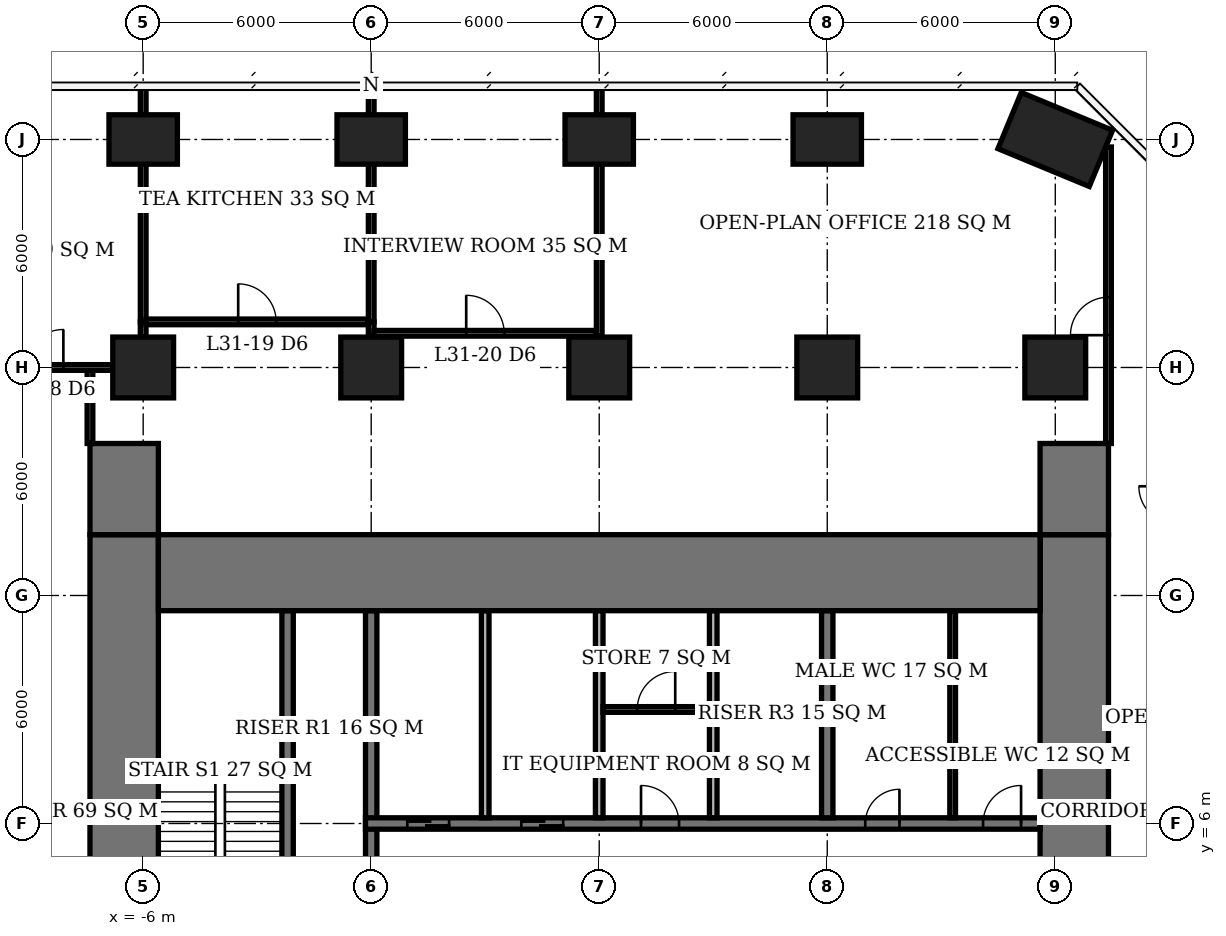
"""IFC4 building model, lengths in metres.
Left out: names, types, materials, properties, quantities, classifications, styles, units other than length and angle.
Written with IfcOpenShell. Run it as: python <this file> out.ifc"""

import sys

from ifc_helpers import new_model, si_unit, direction, frame, frame_2d, origin, origin_2d, place, context, subcontext, project, spatial, rectangle, extrude, element, fill, save


model = new_model("IFC4")
c1 = context("Model", 3, precision=1e-05, world=origin(), true_north=direction((0.0, 1.0)))
c2 = subcontext(c1, "Body", "Model", "MODEL_VIEW")
j1 = project(units=[si_unit("LENGTHUNIT", "METRE"), si_unit("PLANEANGLEUNIT", "RADIAN")], contexts=[c1])
p1 = place(None, origin())
s1 = spatial("IfcSite", under=j1, at=p1, CompositionType="ELEMENT")
p2 = place(p1, origin())
s2 = spatial("IfcBuilding", under=s1, at=p2, CompositionType="ELEMENT")
p3 = place(p2, frame((0.0, 0.0, 128.9)))
s3 = spatial("IfcBuildingStorey", under=s2, at=p3, CompositionType="ELEMENT", Elevation=128.9)
p4 = place(p3, frame((-6.0, 18.0, 0.0), z_axis=(0.0, 0.0, 1.0), x_axis=(1.0, 0.0, 0.0)))
e1 = element("IfcColumn", 1, at=p4, inside=s3, PredefinedType="COLUMN", context=c2, shape_type="SweptSolid", body=[
    extrude(rectangle(XDim=1.6, YDim=1.6, at=origin_2d()), origin(), (0.0, 0.0, 1.0), 3.9),
])
p5 = place(p3, frame((-6.0, 24.0, 0.0), z_axis=(0.0, 0.0, 1.0), x_axis=(1.0, 0.0, 0.0)))
e2 = element("IfcColumn", 2, at=p5, inside=s3, PredefinedType="COLUMN", context=c2, shape_type="SweptSolid", body=[
    extrude(rectangle(XDim=1.8, YDim=1.3, at=origin_2d()), origin(), (0.0, 0.0, 1.0), 3.9),
])
p6 = place(p3, frame((0.0, 18.0, 0.0), z_axis=(0.0, 0.0, 1.0), x_axis=(1.0, 0.0, 0.0)))
e3 = element("IfcColumn", 3, at=p6, inside=s3, PredefinedType="COLUMN", context=c2, shape_type="SweptSolid", body=[
    extrude(rectangle(XDim=1.6, YDim=1.6, at=origin_2d()), origin(), (0.0, 0.0, 1.0), 3.9),
])
p7 = place(p3, frame((0.0, 24.0, 0.0), z_axis=(0.0, 0.0, 1.0), x_axis=(1.0, 0.0, 0.0)))
e4 = element("IfcColumn", 4, at=p7, inside=s3, PredefinedType="COLUMN", context=c2, shape_type="SweptSolid", body=[
    extrude(rectangle(XDim=1.8, YDim=1.3, at=origin_2d()), origin(), (0.0, 0.0, 1.0), 3.9),
])
p8 = place(p3, frame((6.0, 18.0, 0.0), z_axis=(0.0, 0.0, 1.0), x_axis=(1.0, 0.0, 0.0)))
e5 = element("IfcColumn", 5, at=p8, inside=s3, PredefinedType="COLUMN", context=c2, shape_type="SweptSolid", body=[
    extrude(rectangle(XDim=1.6, YDim=1.6, at=origin_2d()), origin(), (0.0, 0.0, 1.0), 3.9),
])
p9 = place(p3, frame((6.0, 24.0, 0.0), z_axis=(0.0, 0.0, 1.0), x_axis=(1.0, 0.0, 0.0)))
e6 = element("IfcColumn", 6, at=p9, inside=s3, PredefinedType="COLUMN", context=c2, shape_type="SweptSolid", body=[
    extrude(rectangle(XDim=1.8, YDim=1.3, at=origin_2d()), origin(), (0.0, 0.0, 1.0), 3.9),
])
p10 = place(p3, frame((12.0, 18.0, 0.0), z_axis=(0.0, 0.0, 1.0), x_axis=(1.0, 0.0, 0.0)))
e7 = element("IfcColumn", 7, at=p10, inside=s3, PredefinedType="COLUMN", context=c2, shape_type="SweptSolid", body=[
    extrude(rectangle(XDim=1.6, YDim=1.6, at=origin_2d()), origin(), (0.0, 0.0, 1.0), 3.9),
])
p11 = place(p3, frame((12.0, 24.0, 0.0), z_axis=(0.0, 0.0, 1.0), x_axis=(1.0, 0.0, 0.0)))
e8 = element("IfcColumn", 8, at=p11, inside=s3, PredefinedType="COLUMN", context=c2, shape_type="SweptSolid", body=[
    extrude(rectangle(XDim=1.8, YDim=1.3, at=origin_2d()), origin(), (0.0, 0.0, 1.0), 3.9),
])
p12 = place(p3, frame((18.0, 18.0, 0.0), z_axis=(0.0, 0.0, 1.0), x_axis=(1.0, 0.0, 0.0)))
e9 = element("IfcColumn", 9, at=p12, inside=s3, PredefinedType="COLUMN", context=c2, shape_type="SweptSolid", body=[
    extrude(rectangle(XDim=1.6, YDim=1.6, at=origin_2d()), origin(), (0.0, 0.0, 1.0), 3.9),
])
p13 = place(p3, frame((18.0, 24.0, 0.0), z_axis=(0.0, 0.0, 1.0), x_axis=(0.923879532511, -0.382683432365, 0.0)))
e10 = element("IfcColumn", 10, at=p13, inside=s3, PredefinedType="COLUMN", context=c2, shape_type="SweptSolid", body=[
    extrude(rectangle(XDim=2.6, YDim=1.6, at=origin_2d()), origin(), (0.0, 0.0, 1.0), 3.9),
])
p14 = place(p3, frame((-5.6, 12.6, 0.0), z_axis=(0.0, 0.0, 1.0), x_axis=(1.0, 0.0, 0.0)))
e11 = element("IfcWall", 11, at=p14, inside=s3, PredefinedType="SHEAR", context=c2, shape_type="SweptSolid", body=[
    extrude(rectangle(XDim=23.2, YDim=2.0, at=frame_2d((11.6, 0.0))), origin(), (0.0, 0.0, 1.0), 3.9),
])
p15 = place(p3, frame((-6.5, -7.6, 0.0), z_axis=(0.0, 0.0, 1.0), x_axis=(0.0, 1.0, 0.0)))
e12 = element("IfcWall", 12, at=p15, inside=s3, PredefinedType="SHEAR", context=c2, shape_type="SweptSolid", body=[
    extrude(rectangle(XDim=21.2, YDim=1.8, at=frame_2d((10.6, 0.0))), origin(), (0.0, 0.0, 1.0), 3.9),
])
p16 = place(p15, frame((7.8, 0.0, 0.0)))
e13 = element("IfcOpeningElement", 13, at=p16, cuts=e12, PredefinedType="OPENING", context=c2, shape_type="SweptSolid", body=[
    extrude(rectangle(XDim=1.8, YDim=2.4, at=frame_2d((0.9, 1.2))), frame((0.0, 0.91, 0.0), z_axis=(0.0, -1.0, 0.0), x_axis=(1.0, 0.0, 0.0)), (0.0, 0.0, 1.0), 1.82),
])
p17 = place(p3, frame((18.5, -7.6, 0.0), z_axis=(0.0, 0.0, 1.0), x_axis=(0.0, 1.0, 0.0)))
e14 = element("IfcWall", 14, at=p17, inside=s3, PredefinedType="SHEAR", context=c2, shape_type="SweptSolid", body=[
    extrude(rectangle(XDim=21.2, YDim=1.8, at=frame_2d((10.6, 0.0))), origin(), (0.0, 0.0, 1.0), 3.9),
])
p18 = place(p17, frame((9.2, 0.0, 0.0)))
e15 = element("IfcOpeningElement", 15, at=p18, cuts=e14, PredefinedType="OPENING", context=c2, shape_type="SweptSolid", body=[
    extrude(rectangle(XDim=1.8, YDim=2.4, at=frame_2d((0.9, 1.2))), frame((0.0, 0.91, 0.0), z_axis=(0.0, -1.0, 0.0), x_axis=(1.0, 0.0, 0.0)), (0.0, 0.0, 1.0), 1.82),
])
for number, where, z_axis, x_axis in (
    (16, (-6.5, 13.6, 0.0), (0.0, 0.0, 1.0), (0.0, 1.0, 0.0)),
    (17, (18.5, 13.6, 0.0), (0.0, 0.0, 1.0), (0.0, 1.0, 0.0)),
):
    element("IfcWall", number, at=place(p3, frame(where, z_axis=z_axis, x_axis=x_axis)), inside=s3, PredefinedType="SHEAR", context=c2, shape_type="SweptSolid", body=[
        extrude(rectangle(XDim=2.4, YDim=1.8, at=frame_2d((1.2, 0.0))), origin(), (0.0, 0.0, 1.0), 3.9),
    ])
p19 = place(p3, frame((-0.15, 6.0, 0.0), z_axis=(0.0, 0.0, 1.0), x_axis=(1.0, 0.0, 0.0)))
e18 = element("IfcWall", 18, at=p19, inside=s3, PredefinedType="SHEAR", context=c2, shape_type="SweptSolid", body=[
    extrude(rectangle(XDim=17.75, YDim=0.3, at=frame_2d((8.875, 0.0))), origin(), (0.0, 0.0, 1.0), 3.9),
])
p20 = place(p19, frame((13.15, 0.0, 0.0)))
e19 = element("IfcOpeningElement", 19, at=p20, cuts=e18, PredefinedType="OPENING", context=c2, shape_type="SweptSolid", body=[
    extrude(rectangle(XDim=0.9, YDim=2.1, at=frame_2d((0.45, 1.05))), frame((0.0, 0.16, 0.0), z_axis=(0.0, -1.0, 0.0), x_axis=(1.0, 0.0, 0.0)), (0.0, 0.0, 1.0), 0.32),
])
p21 = place(p19, frame((16.25, 0.0, 0.0)))
e20 = element("IfcOpeningElement", 20, at=p21, cuts=e18, PredefinedType="OPENING", context=c2, shape_type="SweptSolid", body=[
    extrude(rectangle(XDim=1.0, YDim=2.1, at=frame_2d((0.5, 1.05))), frame((0.0, 0.16, 0.0), z_axis=(0.0, -1.0, 0.0), x_axis=(1.0, 0.0, 0.0)), (0.0, 0.0, 1.0), 0.32),
])
p22 = place(p19, frame((7.25, 0.0, 0.0)))
e21 = element("IfcOpeningElement", 21, at=p22, cuts=e18, PredefinedType="OPENING", context=c2, shape_type="SweptSolid", body=[
    extrude(rectangle(XDim=1.0, YDim=2.1, at=frame_2d((0.5, 1.05))), frame((0.0, 0.16, 0.0), z_axis=(0.0, -1.0, 0.0), x_axis=(1.0, 0.0, 0.0)), (0.0, 0.0, 1.0), 0.32),
])
p23 = place(p19, frame((1.1, 0.0, 0.0)))
e22 = element("IfcOpeningElement", 22, at=p23, cuts=e18, PredefinedType="OPENING", context=c2, shape_type="SweptSolid", body=[
    extrude(rectangle(XDim=1.1, YDim=2.1, at=frame_2d((0.55, 1.05))), frame((0.0, 0.16, 0.0), z_axis=(0.0, -1.0, 0.0), x_axis=(1.0, 0.0, 0.0)), (0.0, 0.0, 1.0), 0.32),
])
p24 = place(p19, frame((4.1, 0.0, 0.0)))
e23 = element("IfcOpeningElement", 23, at=p24, cuts=e18, PredefinedType="OPENING", context=c2, shape_type="SweptSolid", body=[
    extrude(rectangle(XDim=1.1, YDim=2.1, at=frame_2d((0.55, 1.05))), frame((0.0, 0.16, 0.0), z_axis=(0.0, -1.0, 0.0), x_axis=(1.0, 0.0, 0.0)), (0.0, 0.0, 1.0), 0.32),
])
p25 = place(p3, frame((0.0, 3.15, 0.0), z_axis=(0.0, 0.0, 1.0), x_axis=(0.0, 1.0, 0.0)))
e24 = element("IfcWall", 24, at=p25, inside=s3, PredefinedType="SHEAR", context=c2, shape_type="SweptSolid", body=[
    extrude(rectangle(XDim=8.45, YDim=0.3, at=frame_2d((4.225, 0.0))), origin(), (0.0, 0.0, 1.0), 3.9),
])
p26 = place(p3, frame((12.0, 6.15, 0.0), z_axis=(0.0, 0.0, 1.0), x_axis=(0.0, 1.0, 0.0)))
e25 = element("IfcWall", 25, at=p26, inside=s3, PredefinedType="SHEAR", context=c2, shape_type="SweptSolid", body=[
    extrude(rectangle(XDim=5.45, YDim=0.3, at=frame_2d((2.725, 0.0))), origin(), (0.0, 0.0, 1.0), 3.9),
])
p27 = place(p3, frame((-2.2, 3.15, 0.0), z_axis=(0.0, 0.0, 1.0), x_axis=(0.0, 1.0, 0.0)))
e26 = element("IfcWall", 26, at=p27, inside=s3, PredefinedType="SHEAR", context=c2, shape_type="SweptSolid", body=[
    extrude(rectangle(XDim=8.45, YDim=0.3, at=frame_2d((4.225, 0.0))), origin(), (0.0, 0.0, 1.0), 3.9),
])
for number, where, z_axis, x_axis in (
    (27, (3.0, 6.15, 0.0), (0.0, 0.0, 1.0), (0.0, 1.0, 0.0)),
    (28, (6.0, 6.15, 0.0), (0.0, 0.0, 1.0), (0.0, 1.0, 0.0)),
    (29, (9.0, 6.15, 0.0), (0.0, 0.0, 1.0), (0.0, 1.0, 0.0)),
):
    element("IfcWall", number, at=place(p3, frame(where, z_axis=z_axis, x_axis=x_axis)), inside=s3, PredefinedType="SOLIDWALL", context=c2, shape_type="SweptSolid", body=[
        extrude(rectangle(XDim=5.45, YDim=0.2, at=frame_2d((2.725, 0.0))), origin(), (0.0, 0.0, 1.0), 3.9),
    ])
p28 = place(p3, frame((15.3, 6.15, 0.0), z_axis=(0.0, 0.0, 1.0), x_axis=(0.0, 1.0, 0.0)))
e30 = element("IfcWall", 30, at=p28, inside=s3, PredefinedType="PLUMBINGWALL", context=c2, shape_type="SweptSolid", body=[
    extrude(rectangle(XDim=5.45, YDim=0.15, at=frame_2d((2.725, 0.0))), origin(), (0.0, 0.0, 1.0), 3.65),
])
p29 = place(p3, frame((6.1, 9.0, 0.0), z_axis=(0.0, 0.0, 1.0), x_axis=(1.0, 0.0, 0.0)))
e31 = element("IfcWall", 31, at=p29, inside=s3, PredefinedType="PARTITIONING", context=c2, shape_type="SweptSolid", body=[
    extrude(rectangle(XDim=2.8, YDim=0.15, at=frame_2d((1.4, 0.0))), origin(), (0.0, 0.0, 1.0), 3.65),
])
p30 = place(p29, frame((0.9, 0.0, 0.0)))
e32 = element("IfcOpeningElement", 32, at=p30, cuts=e31, PredefinedType="OPENING", context=c2, shape_type="SweptSolid", body=[
    extrude(rectangle(XDim=1.0, YDim=2.1, at=frame_2d((0.5, 1.05))), frame((0.0, 0.085, 0.0), z_axis=(0.0, -1.0, 0.0), x_axis=(1.0, 0.0, 0.0)), (0.0, 0.0, 1.0), 0.17),
])
p31 = place(p3, frame((-11.2, 18.0, 0.0), z_axis=(0.0, 0.0, 1.0), x_axis=(1.0, 0.0, 0.0)))
e33 = element("IfcWall", 33, at=p31, inside=s3, PredefinedType="PARTITIONING", context=c2, shape_type="SweptSolid", body=[
    extrude(rectangle(XDim=4.4, YDim=0.15, at=frame_2d((2.2, 0.0))), origin(), (0.0, 0.0, 1.0), 3.65),
])
p32 = place(p31, frame((2.1, 0.0, 0.0)))
e34 = element("IfcOpeningElement", 34, at=p32, cuts=e33, PredefinedType="OPENING", context=c2, shape_type="SweptSolid", body=[
    extrude(rectangle(XDim=1.0, YDim=2.1, at=frame_2d((0.5, 1.05))), frame((0.0, 0.085, 0.0), z_axis=(0.0, -1.0, 0.0), x_axis=(1.0, 0.0, 0.0)), (0.0, 0.0, 1.0), 0.17),
])
p33 = place(p3, frame((0.075, 18.9, 0.0), z_axis=(0.0, 0.0, 1.0), x_axis=(1.0, 0.0, 0.0)))
e35 = element("IfcWall", 35, at=p33, inside=s3, PredefinedType="PARTITIONING", context=c2, shape_type="SweptSolid", body=[
    extrude(rectangle(XDim=5.85, YDim=0.15, at=frame_2d((2.925, 0.0))), origin(), (0.0, 0.0, 1.0), 3.65),
])
p34 = place(p33, frame((2.425, 0.0, 0.0)))
e36 = element("IfcOpeningElement", 36, at=p34, cuts=e35, PredefinedType="OPENING", context=c2, shape_type="SweptSolid", body=[
    extrude(rectangle(XDim=1.0, YDim=2.1, at=frame_2d((0.5, 1.05))), frame((0.0, 0.085, 0.0), z_axis=(0.0, -1.0, 0.0), x_axis=(1.0, 0.0, 0.0)), (0.0, 0.0, 1.0), 0.17),
])
p35 = place(p3, frame((-5.925, 19.2, 0.0), z_axis=(0.0, 0.0, 1.0), x_axis=(1.0, 0.0, 0.0)))
e37 = element("IfcWall", 37, at=p35, inside=s3, PredefinedType="PARTITIONING", context=c2, shape_type="SweptSolid", body=[
    extrude(rectangle(XDim=5.85, YDim=0.15, at=frame_2d((2.925, 0.0))), origin(), (0.0, 0.0, 1.0), 3.65),
])
p36 = place(p35, frame((2.425, 0.0, 0.0)))
e38 = element("IfcOpeningElement", 38, at=p36, cuts=e37, PredefinedType="OPENING", context=c2, shape_type="SweptSolid", body=[
    extrude(rectangle(XDim=1.0, YDim=2.1, at=frame_2d((0.5, 1.05))), frame((0.0, 0.085, 0.0), z_axis=(0.0, -1.0, 0.0), x_axis=(1.0, 0.0, 0.0)), (0.0, 0.0, 1.0), 0.17),
])
p37 = place(p3, frame((-6.0, 18.8, 0.0), z_axis=(0.0, 0.0, 1.0), x_axis=(0.0, 1.0, 0.0)))
e39 = element("IfcWall", 39, at=p37, inside=s3, PredefinedType="PARTITIONING", context=c2, shape_type="SweptSolid", body=[
    extrude(rectangle(XDim=0.4, YDim=0.15, at=frame_2d((0.2, 0.0))), origin(), (0.0, 0.0, 1.0), 3.65),
])
p38 = place(p3, frame((-6.0, 19.2, 0.0), z_axis=(0.0, 0.0, 1.0), x_axis=(0.0, 1.0, 0.0)))
e40 = element("IfcWall", 40, at=p38, inside=s3, PredefinedType="PARTITIONING", context=c2, shape_type="SweptSolid", body=[
    extrude(rectangle(XDim=4.15, YDim=0.15, at=frame_2d((2.075, 0.0))), origin(), (0.0, 0.0, 1.0), 3.65),
])
p39 = place(p3, frame((-6.0, 24.65, 0.0), z_axis=(0.0, 0.0, 1.0), x_axis=(0.0, 1.0, 0.0)))
e41 = element("IfcWall", 41, at=p39, inside=s3, PredefinedType="PARTITIONING", context=c2, shape_type="SweptSolid", body=[
    extrude(rectangle(XDim=0.75, YDim=0.15, at=frame_2d((0.375, 0.0))), origin(), (0.0, 0.0, 1.0), 3.65),
])
p40 = place(p3, frame((0.0, 18.825, 0.0), z_axis=(0.0, 0.0, 1.0), x_axis=(0.0, 1.0, 0.0)))
e42 = element("IfcWall", 42, at=p40, inside=s3, PredefinedType="PARTITIONING", context=c2, shape_type="SweptSolid", body=[
    extrude(rectangle(XDim=0.375, YDim=0.15, at=frame_2d((0.188, 0.0))), origin(), (0.0, 0.0, 1.0), 3.65),
])
p41 = place(p3, frame((0.0, 19.2, 0.0), z_axis=(0.0, 0.0, 1.0), x_axis=(0.0, 1.0, 0.0)))
e43 = element("IfcWall", 43, at=p41, inside=s3, PredefinedType="PARTITIONING", context=c2, shape_type="SweptSolid", body=[
    extrude(rectangle(XDim=4.15, YDim=0.15, at=frame_2d((2.075, 0.0))), origin(), (0.0, 0.0, 1.0), 3.65),
])
p42 = place(p3, frame((0.0, 24.65, 0.0), z_axis=(0.0, 0.0, 1.0), x_axis=(0.0, 1.0, 0.0)))
e44 = element("IfcWall", 44, at=p42, inside=s3, PredefinedType="PARTITIONING", context=c2, shape_type="SweptSolid", body=[
    extrude(rectangle(XDim=0.7, YDim=0.15, at=frame_2d((0.35, 0.0))), origin(), (0.0, 0.0, 1.0), 3.65),
])
p43 = place(p3, frame((6.0, 18.825, 0.0), z_axis=(0.0, 0.0, 1.0), x_axis=(0.0, 1.0, 0.0)))
e45 = element("IfcWall", 45, at=p43, inside=s3, PredefinedType="PARTITIONING", context=c2, shape_type="SweptSolid", body=[
    extrude(rectangle(XDim=4.525, YDim=0.15, at=frame_2d((2.263, 0.0))), origin(), (0.0, 0.0, 1.0), 3.65),
])
p44 = place(p3, frame((6.0, 24.65, 0.0), z_axis=(0.0, 0.0, 1.0), x_axis=(0.0, 1.0, 0.0)))
e46 = element("IfcWall", 46, at=p44, inside=s3, PredefinedType="PARTITIONING", context=c2, shape_type="SweptSolid", body=[
    extrude(rectangle(XDim=0.75, YDim=0.15, at=frame_2d((0.375, 0.0))), origin(), (0.0, 0.0, 1.0), 3.65),
])
p45 = place(p3, frame((-7.4, 16.0, 0.0), z_axis=(0.0, 0.0, 1.0), x_axis=(0.0, 1.0, 0.0)))
e47 = element("IfcWall", 47, at=p45, inside=s3, PredefinedType="PARTITIONING", context=c2, shape_type="SweptSolid", body=[
    extrude(rectangle(XDim=1.925, YDim=0.15, at=frame_2d((0.962, 0.0))), origin(), (0.0, 0.0, 1.0), 3.65),
])
p46 = place(p3, frame((19.4, 16.0, 0.0), z_axis=(0.0, 0.0, 1.0), x_axis=(0.0, 1.0, 0.0)))
e48 = element("IfcWall", 48, at=p46, inside=s3, PredefinedType="PARTITIONING", context=c2, shape_type="SweptSolid", body=[
    extrude(rectangle(XDim=7.802, YDim=0.15, at=frame_2d((3.901, 0.0))), origin(), (0.0, 0.0, 1.0), 3.65),
])
p47 = place(p46, frame((2.85, 0.0, 0.0)))
e49 = element("IfcOpeningElement", 49, at=p47, cuts=e48, PredefinedType="OPENING", context=c2, shape_type="SweptSolid", body=[
    extrude(rectangle(XDim=1.0, YDim=2.1, at=frame_2d((0.5, 1.05))), frame((0.0, 0.085, 0.0), z_axis=(0.0, -1.0, 0.0), x_axis=(1.0, 0.0, 0.0)), (0.0, 0.0, 1.0), 0.17),
])
p48 = place(p20, origin())
e50 = element("IfcDoor", 50, at=p48, inside=s3, OperationType="SINGLE_SWING_RIGHT", PredefinedType="DOOR", context=c2, shape_type="SweptSolid", body=[
    extrude(rectangle(XDim=0.9, YDim=2.1, at=frame_2d((0.45, 1.05))), frame((0.0, 0.025, 0.0), z_axis=(0.0, -1.0, 0.0), x_axis=(1.0, 0.0, 0.0)), (0.0, 0.0, 1.0), 0.05),
])
fill(e19, e50)
p49 = place(p21, origin())
e51 = element("IfcDoor", 51, at=p49, inside=s3, OperationType="SINGLE_SWING_RIGHT", PredefinedType="DOOR", context=c2, shape_type="SweptSolid", body=[
    extrude(rectangle(XDim=1.0, YDim=2.1, at=frame_2d((0.5, 1.05))), frame((0.0, 0.025, 0.0), z_axis=(0.0, -1.0, 0.0), x_axis=(1.0, 0.0, 0.0)), (0.0, 0.0, 1.0), 0.05),
])
fill(e20, e51)
p50 = place(p30, origin())
e52 = element("IfcDoor", 52, at=p50, inside=s3, OperationType="SINGLE_SWING_RIGHT", PredefinedType="DOOR", context=c2, shape_type="SweptSolid", body=[
    extrude(rectangle(XDim=1.0, YDim=2.1, at=frame_2d((0.5, 1.05))), frame((0.0, 0.025, 0.0), z_axis=(0.0, -1.0, 0.0), x_axis=(1.0, 0.0, 0.0)), (0.0, 0.0, 1.0), 0.05),
])
fill(e32, e52)
p51 = place(p22, origin())
e53 = element("IfcDoor", 53, at=p51, inside=s3, OperationType="SINGLE_SWING_LEFT", PredefinedType="DOOR", context=c2, shape_type="SweptSolid", body=[
    extrude(rectangle(XDim=1.0, YDim=2.1, at=frame_2d((0.5, 1.05))), frame((0.0, 0.025, 0.0), z_axis=(0.0, -1.0, 0.0), x_axis=(1.0, 0.0, 0.0)), (0.0, 0.0, 1.0), 0.05),
])
fill(e21, e53)
p52 = place(p23, origin())
e54 = element("IfcDoor", 54, at=p52, inside=s3, OperationType="DOUBLE_DOOR_SLIDING", PredefinedType="USERDEFINED", context=c2, shape_type="SweptSolid", body=[
    extrude(rectangle(XDim=1.1, YDim=2.1, at=frame_2d((0.55, 1.05))), frame((0.0, 0.025, 0.0), z_axis=(0.0, -1.0, 0.0), x_axis=(1.0, 0.0, 0.0)), (0.0, 0.0, 1.0), 0.05),
])
fill(e22, e54)
p53 = place(p24, origin())
e55 = element("IfcDoor", 55, at=p53, inside=s3, OperationType="DOUBLE_DOOR_SLIDING", PredefinedType="USERDEFINED", context=c2, shape_type="SweptSolid", body=[
    extrude(rectangle(XDim=1.1, YDim=2.1, at=frame_2d((0.55, 1.05))), frame((0.0, 0.025, 0.0), z_axis=(0.0, -1.0, 0.0), x_axis=(1.0, 0.0, 0.0)), (0.0, 0.0, 1.0), 0.05),
])
fill(e23, e55)
p54 = place(p32, origin())
e56 = element("IfcDoor", 56, at=p54, inside=s3, OperationType="SINGLE_SWING_RIGHT", PredefinedType="DOOR", context=c2, shape_type="SweptSolid", body=[
    extrude(rectangle(XDim=1.0, YDim=2.1, at=frame_2d((0.5, 1.05))), frame((0.0, 0.025, 0.0), z_axis=(0.0, -1.0, 0.0), x_axis=(1.0, 0.0, 0.0)), (0.0, 0.0, 1.0), 0.05),
])
fill(e34, e56)
p55 = place(p36, origin())
e57 = element("IfcDoor", 57, at=p55, inside=s3, OperationType="SINGLE_SWING_LEFT", PredefinedType="DOOR", context=c2, shape_type="SweptSolid", body=[
    extrude(rectangle(XDim=1.0, YDim=2.1, at=frame_2d((0.5, 1.05))), frame((0.0, 0.025, 0.0), z_axis=(0.0, -1.0, 0.0), x_axis=(1.0, 0.0, 0.0)), (0.0, 0.0, 1.0), 0.05),
])
fill(e38, e57)
p56 = place(p34, origin())
e58 = element("IfcDoor", 58, at=p56, inside=s3, OperationType="SINGLE_SWING_LEFT", PredefinedType="DOOR", context=c2, shape_type="SweptSolid", body=[
    extrude(rectangle(XDim=1.0, YDim=2.1, at=frame_2d((0.5, 1.05))), frame((0.0, 0.025, 0.0), z_axis=(0.0, -1.0, 0.0), x_axis=(1.0, 0.0, 0.0)), (0.0, 0.0, 1.0), 0.05),
])
fill(e36, e58)
p57 = place(p47, origin())
e59 = element("IfcDoor", 59, at=p57, inside=s3, OperationType="SINGLE_SWING_LEFT", PredefinedType="DOOR", context=c2, shape_type="SweptSolid", body=[
    extrude(rectangle(XDim=1.0, YDim=2.1, at=frame_2d((0.5, 1.05))), frame((0.0, 0.025, 0.0), z_axis=(0.0, -1.0, 0.0), x_axis=(1.0, 0.0, 0.0)), (0.0, 0.0, 1.0), 0.05),
])
fill(e49, e59)
save(model, sys.argv[1])
